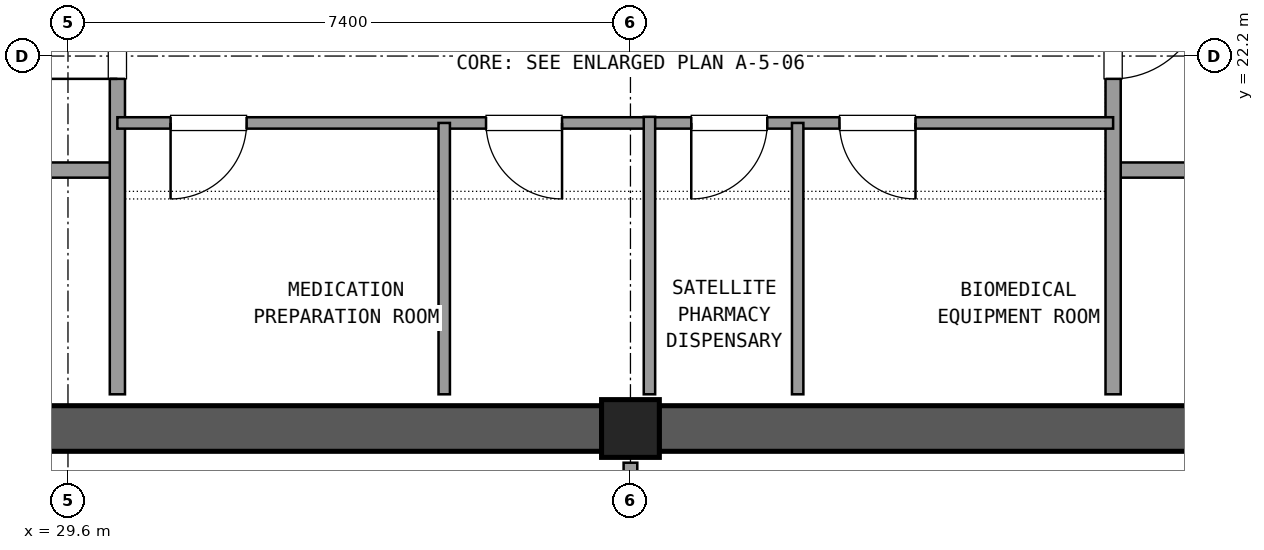
"""IFC4 building model, lengths in metres.
Left out: names, types, materials, properties, quantities, classifications, styles, units other than length and angle.
Written with IfcOpenShell. Run it as: python <this file> out.ifc"""

import sys

from ifc_helpers import new_model, si_unit, direction, frame, frame_2d, origin, origin_2d, place, context, subcontext, project, spatial, rectangle, extrude, element, fill, save


model = new_model("IFC4")
c1 = context("Model", 3, precision=1e-05, world=origin(), true_north=direction((0.0, 1.0)))
c2 = subcontext(c1, "Body", "Model", "MODEL_VIEW")
j1 = project(units=[si_unit("LENGTHUNIT", "METRE"), si_unit("PLANEANGLEUNIT", "RADIAN")], contexts=[c1])
p1 = place(None, origin())
s1 = spatial("IfcSite", under=j1, at=p1, CompositionType="ELEMENT")
p2 = place(p1, origin())
s2 = spatial("IfcBuilding", under=s1, at=p2, CompositionType="ELEMENT")
p3 = place(p2, frame((0.0, 0.0, 271.62)))
s3 = spatial("IfcBuildingStorey", under=s2, at=p3, CompositionType="ELEMENT", Elevation=271.62)
p4 = place(p3, frame((37.0, 17.3, 0.0), z_axis=(0.0, 0.0, 1.0), x_axis=(1.0, 0.0, 0.0)))
e1 = element("IfcColumn", 1, at=p4, inside=s3, PredefinedType="COLUMN", context=c2, shape_type="SweptSolid", body=[
    extrude(rectangle(XDim=0.76, YDim=0.76, at=origin_2d()), origin(), (0.0, 0.0, 1.0), 3.6),
])
for number, where, z_axis, x_axis in (
    (2, (26.175, 17.3, 0.0), (0.0, 0.0, 1.0), (1.0, 0.0, 0.0)),
    (3, (37.375, 17.3, 0.0), (0.0, 0.0, 1.0), (1.0, 0.0, 0.0)),
):
    element("IfcWall", number, at=place(p3, frame(where, z_axis=z_axis, x_axis=x_axis)), inside=s3, PredefinedType="SHEAR", context=c2, shape_type="SweptSolid", body=[
        extrude(rectangle(XDim=10.45, YDim=0.6, at=frame_2d((5.225, 0.0))), origin(), (0.0, 0.0, 1.0), 3.32),
    ])
p5 = place(p3, frame((26.25, 20.7, 0.0), z_axis=(0.0, 0.0, 1.0), x_axis=(1.0, 0.0, 0.0)))
e4 = element("IfcWall", 4, at=p5, inside=s3, PredefinedType="SOLIDWALL", context=c2, shape_type="SweptSolid", body=[
    extrude(rectangle(XDim=4.0, YDim=0.2, at=frame_2d((2.0, 0.0))), origin(), (0.0, 0.0, 1.0), 2.61),
])
p6 = place(p5, frame((0.65, 0.0, 0.0)))
e5 = element("IfcOpeningElement", 5, at=p6, cuts=e4, PredefinedType="OPENING", context=c2, shape_type="SweptSolid", body=[
    extrude(rectangle(XDim=1.2, YDim=2.15, at=frame_2d((0.6, 1.075))), frame((0.0, 0.11, 0.0), z_axis=(0.0, -1.0, 0.0), x_axis=(1.0, 0.0, 0.0)), (0.0, 0.0, 1.0), 0.22),
])
p7 = place(p3, frame((30.25, 17.75, 0.0), z_axis=(0.0, 0.0, 1.0), x_axis=(0.0, 1.0, 0.0)))
e6 = element("IfcWall", 6, at=p7, inside=s3, PredefinedType="SOLIDWALL", context=c2, shape_type="SweptSolid", body=[
    extrude(rectangle(XDim=6.9, YDim=0.2, at=frame_2d((3.45, 0.0))), origin(), (0.0, 0.0, 1.0), 2.61),
])
p8 = place(p7, frame((4.15, 0.0, 0.0)))
e7 = element("IfcOpeningElement", 7, at=p8, cuts=e6, PredefinedType="OPENING", context=c2, shape_type="SweptSolid", body=[
    extrude(rectangle(XDim=1.2, YDim=2.15, at=frame_2d((0.6, 1.075))), frame((0.0, 0.11, 0.0), z_axis=(0.0, -1.0, 0.0), x_axis=(1.0, 0.0, 0.0)), (0.0, 0.0, 1.0), 0.22),
])
p9 = place(p3, frame((43.35, 20.7, 0.0), z_axis=(0.0, 0.0, 1.0), x_axis=(1.0, 0.0, 0.0)))
e8 = element("IfcWall", 8, at=p9, inside=s3, PredefinedType="SOLIDWALL", context=c2, shape_type="SweptSolid", body=[
    extrude(rectangle(XDim=4.4, YDim=0.2, at=frame_2d((2.2, 0.0))), origin(), (0.0, 0.0, 1.0), 2.61),
])
p10 = place(p9, frame((2.35, 0.0, 0.0)))
e9 = element("IfcOpeningElement", 9, at=p10, cuts=e8, PredefinedType="OPENING", context=c2, shape_type="SweptSolid", body=[
    extrude(rectangle(XDim=1.2, YDim=2.15, at=frame_2d((0.6, 1.075))), frame((0.0, 0.11, 0.0), z_axis=(0.0, -1.0, 0.0), x_axis=(1.0, 0.0, 0.0)), (0.0, 0.0, 1.0), 0.22),
])
p11 = place(p3, frame((43.35, 17.75, 0.0), z_axis=(0.0, 0.0, 1.0), x_axis=(0.0, 1.0, 0.0)))
e10 = element("IfcWall", 10, at=p11, inside=s3, PredefinedType="SOLIDWALL", context=c2, shape_type="SweptSolid", body=[
    extrude(rectangle(XDim=6.9, YDim=0.2, at=frame_2d((3.45, 0.0))), origin(), (0.0, 0.0, 1.0), 2.61),
])
p12 = place(p11, frame((4.15, 0.0, 0.0)))
e11 = element("IfcOpeningElement", 11, at=p12, cuts=e10, PredefinedType="OPENING", context=c2, shape_type="SweptSolid", body=[
    extrude(rectangle(XDim=1.2, YDim=2.15, at=frame_2d((0.6, 1.075))), frame((0.0, 0.11, 0.0), z_axis=(0.0, -1.0, 0.0), x_axis=(1.0, 0.0, 0.0)), (0.0, 0.0, 1.0), 0.22),
])
p13 = place(p3, frame((30.25, 21.32, 0.0), z_axis=(0.0, 0.0, 1.0), x_axis=(1.0, 0.0, 0.0)))
e12 = element("IfcWall", 12, at=p13, inside=s3, PredefinedType="PARTITIONING", context=c2, shape_type="SweptSolid", body=[
    extrude(rectangle(XDim=7.0, YDim=0.15, at=frame_2d((3.5, 0.0))), origin(), (0.0, 0.0, 1.0), 2.61),
])
p14 = place(p13, frame((0.7, 0.0, 0.0)))
e13 = element("IfcOpeningElement", 13, at=p14, cuts=e12, PredefinedType="OPENING", context=c2, shape_type="SweptSolid", body=[
    extrude(rectangle(XDim=1.0, YDim=2.15, at=frame_2d((0.5, 1.075))), frame((0.0, 0.085, 0.0), z_axis=(0.0, -1.0, 0.0), x_axis=(1.0, 0.0, 0.0)), (0.0, 0.0, 1.0), 0.17),
])
p15 = place(p13, frame((4.85, 0.0, 0.0)))
e14 = element("IfcOpeningElement", 14, at=p15, cuts=e12, PredefinedType="OPENING", context=c2, shape_type="SweptSolid", body=[
    extrude(rectangle(XDim=1.0, YDim=2.15, at=frame_2d((0.5, 1.075))), frame((0.0, 0.085, 0.0), z_axis=(0.0, -1.0, 0.0), x_axis=(1.0, 0.0, 0.0)), (0.0, 0.0, 1.0), 0.17),
])
p16 = place(p3, frame((34.55, 17.75, 0.0), z_axis=(0.0, 0.0, 1.0), x_axis=(0.0, 1.0, 0.0)))
e15 = element("IfcWall", 15, at=p16, inside=s3, PredefinedType="PARTITIONING", context=c2, shape_type="SweptSolid", body=[
    extrude(rectangle(XDim=3.57, YDim=0.15, at=frame_2d((1.785, 0.0))), origin(), (0.0, 0.0, 1.0), 2.61),
])
p17 = place(p3, frame((37.25, 21.32, 0.0), z_axis=(0.0, 0.0, 1.0), x_axis=(1.0, 0.0, 0.0)))
e16 = element("IfcWall", 16, at=p17, inside=s3, PredefinedType="PARTITIONING", context=c2, shape_type="SweptSolid", body=[
    extrude(rectangle(XDim=6.1, YDim=0.15, at=frame_2d((3.05, 0.0))), origin(), (0.0, 0.0, 1.0), 2.61),
])
p18 = place(p17, frame((0.55, 0.0, 0.0)))
e17 = element("IfcOpeningElement", 17, at=p18, cuts=e16, PredefinedType="OPENING", context=c2, shape_type="SweptSolid", body=[
    extrude(rectangle(XDim=1.0, YDim=2.15, at=frame_2d((0.5, 1.075))), frame((0.0, 0.085, 0.0), z_axis=(0.0, -1.0, 0.0), x_axis=(1.0, 0.0, 0.0)), (0.0, 0.0, 1.0), 0.17),
])
p19 = place(p17, frame((2.5, 0.0, 0.0)))
e18 = element("IfcOpeningElement", 18, at=p19, cuts=e16, PredefinedType="OPENING", context=c2, shape_type="SweptSolid", body=[
    extrude(rectangle(XDim=1.0, YDim=2.15, at=frame_2d((0.5, 1.075))), frame((0.0, 0.085, 0.0), z_axis=(0.0, -1.0, 0.0), x_axis=(1.0, 0.0, 0.0)), (0.0, 0.0, 1.0), 0.17),
])
p20 = place(p3, frame((39.2, 17.75, 0.0), z_axis=(0.0, 0.0, 1.0), x_axis=(0.0, 1.0, 0.0)))
e19 = element("IfcWall", 19, at=p20, inside=s3, PredefinedType="PARTITIONING", context=c2, shape_type="SweptSolid", body=[
    extrude(rectangle(XDim=3.57, YDim=0.15, at=frame_2d((1.785, 0.0))), origin(), (0.0, 0.0, 1.0), 2.61),
])
p21 = place(p3, frame((37.25, 17.75, 0.0), z_axis=(0.0, 0.0, 1.0), x_axis=(0.0, 1.0, 0.0)))
e20 = element("IfcWall", 20, at=p21, inside=s3, PredefinedType="PARTITIONING", context=c2, shape_type="SweptSolid", body=[
    extrude(rectangle(XDim=3.65, YDim=0.15, at=frame_2d((1.825, 0.0))), origin(), (0.0, 0.0, 1.0), 2.61),
])
p22 = place(p3, frame((37.0, 14.15, 0.0), z_axis=(0.0, 0.0, 1.0), x_axis=(0.0, 1.0, 0.0)))
e21 = element("IfcWall", 21, at=p22, inside=s3, PredefinedType="PARTITIONING", context=c2, shape_type="SweptSolid", body=[
    extrude(rectangle(XDim=2.7, YDim=0.18, at=frame_2d((1.35, 0.0))), origin(), (0.0, 0.0, 1.0), 2.61),
])
p23 = place(p22, frame((0.35, 0.0, 0.0)))
e22 = element("IfcOpeningElement", 22, at=p23, cuts=e21, PredefinedType="OPENING", context=c2, shape_type="SweptSolid", body=[
    extrude(rectangle(XDim=2.0, YDim=2.2, at=frame_2d((1.0, 1.1))), frame((0.0, 0.1, 0.0), z_axis=(0.0, -1.0, 0.0), x_axis=(1.0, 0.0, 0.0)), (0.0, 0.0, 1.0), 0.2),
])
p24 = place(p8, origin())
e23 = element("IfcDoor", 23, at=p24, inside=s3, OperationType="SINGLE_SWING_LEFT", PredefinedType="DOOR", context=c2, shape_type="SweptSolid", body=[
    extrude(rectangle(XDim=1.2, YDim=2.15, at=frame_2d((0.6, 1.075))), frame((0.0, 0.025, 0.0), z_axis=(0.0, -1.0, 0.0), x_axis=(1.0, 0.0, 0.0)), (0.0, 0.0, 1.0), 0.05),
])
fill(e7, e23)
p25 = place(p12, frame((1.2, 0.0, 0.0), z_axis=(0.0, 0.0, 1.0), x_axis=(-1.0, 0.0, 0.0)))
e24 = element("IfcDoor", 24, at=p25, inside=s3, OperationType="SINGLE_SWING_RIGHT", PredefinedType="DOOR", context=c2, shape_type="SweptSolid", body=[
    extrude(rectangle(XDim=1.2, YDim=2.15, at=frame_2d((0.6, 1.075))), frame((0.0, 0.025, 0.0), z_axis=(0.0, -1.0, 0.0), x_axis=(1.0, 0.0, 0.0)), (0.0, 0.0, 1.0), 0.05),
])
fill(e11, e24)
p26 = place(p14, frame((1.0, 0.0, 0.0), z_axis=(0.0, 0.0, 1.0), x_axis=(-1.0, 0.0, 0.0)))
e25 = element("IfcDoor", 25, at=p26, inside=s3, OperationType="SINGLE_SWING_LEFT", PredefinedType="DOOR", context=c2, shape_type="SweptSolid", body=[
    extrude(rectangle(XDim=1.0, YDim=2.15, at=frame_2d((0.5, 1.075))), frame((0.0, 0.025, 0.0), z_axis=(0.0, -1.0, 0.0), x_axis=(1.0, 0.0, 0.0)), (0.0, 0.0, 1.0), 0.05),
])
fill(e13, e25)
p27 = place(p15, frame((1.0, 0.0, 0.0), z_axis=(0.0, 0.0, 1.0), x_axis=(-1.0, 0.0, 0.0)))
e26 = element("IfcDoor", 26, at=p27, inside=s3, OperationType="SINGLE_SWING_RIGHT", PredefinedType="DOOR", context=c2, shape_type="SweptSolid", body=[
    extrude(rectangle(XDim=1.0, YDim=2.15, at=frame_2d((0.5, 1.075))), frame((0.0, 0.025, 0.0), z_axis=(0.0, -1.0, 0.0), x_axis=(1.0, 0.0, 0.0)), (0.0, 0.0, 1.0), 0.05),
])
fill(e14, e26)
p28 = place(p18, frame((1.0, 0.0, 0.0), z_axis=(0.0, 0.0, 1.0), x_axis=(-1.0, 0.0, 0.0)))
e27 = element("IfcDoor", 27, at=p28, inside=s3, OperationType="SINGLE_SWING_LEFT", PredefinedType="DOOR", context=c2, shape_type="SweptSolid", body=[
    extrude(rectangle(XDim=1.0, YDim=2.15, at=frame_2d((0.5, 1.075))), frame((0.0, 0.025, 0.0), z_axis=(0.0, -1.0, 0.0), x_axis=(1.0, 0.0, 0.0)), (0.0, 0.0, 1.0), 0.05),
])
fill(e17, e27)
p29 = place(p19, frame((1.0, 0.0, 0.0), z_axis=(0.0, 0.0, 1.0), x_axis=(-1.0, 0.0, 0.0)))
e28 = element("IfcDoor", 28, at=p29, inside=s3, OperationType="SINGLE_SWING_RIGHT", PredefinedType="DOOR", context=c2, shape_type="SweptSolid", body=[
    extrude(rectangle(XDim=1.0, YDim=2.15, at=frame_2d((0.5, 1.075))), frame((0.0, 0.025, 0.0), z_axis=(0.0, -1.0, 0.0), x_axis=(1.0, 0.0, 0.0)), (0.0, 0.0, 1.0), 0.05),
])
fill(e18, e28)
save(model, sys.argv[1])
